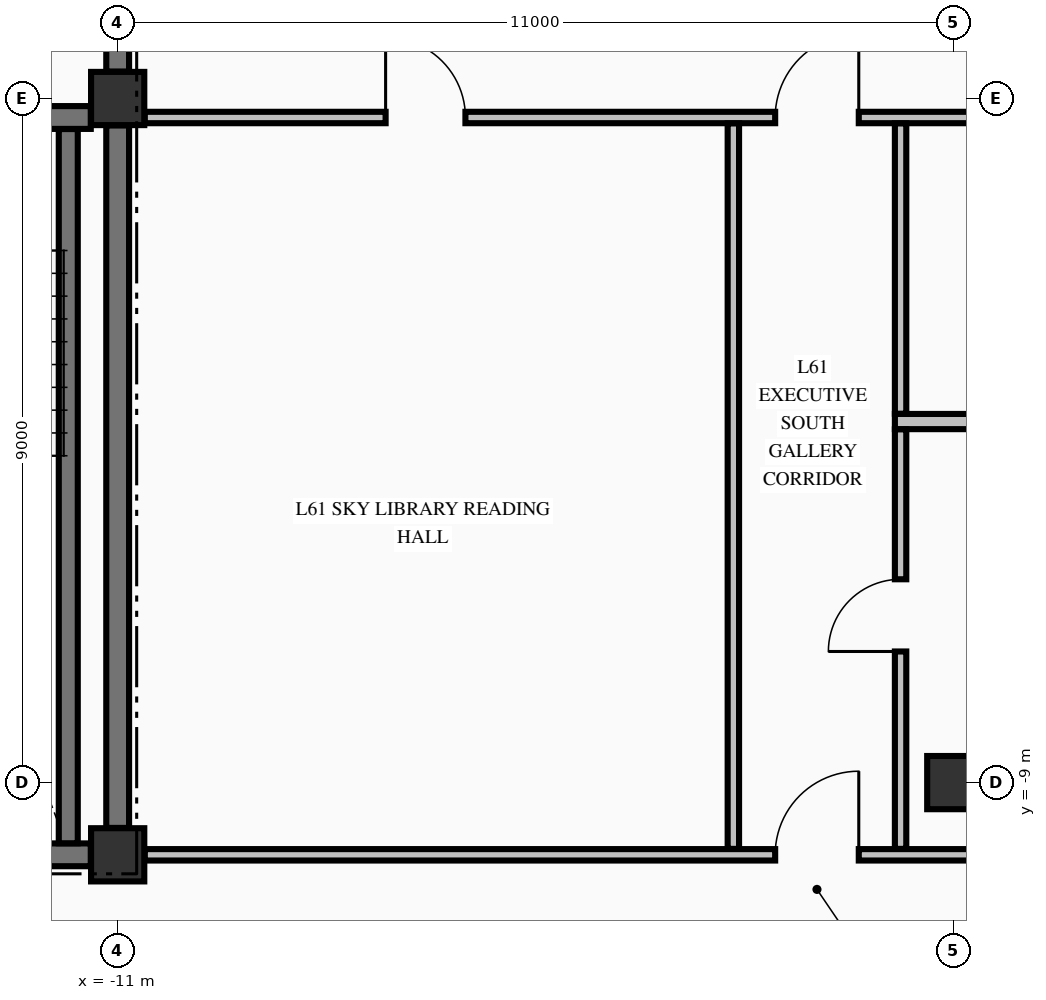
"""IFC4 building model, lengths in metres.
Left out: names, types, materials, properties, quantities, classifications, styles, units other than length and angle.
Written with IfcOpenShell. Run it as: python <this file> out.ifc"""

import sys

from ifc_helpers import new_model, si_unit, direction, frame, frame_2d, origin, origin_2d, place, context, subcontext, project, spatial, rectangle, extrude, element, fill, save


model = new_model("IFC4")
c1 = context("Model", 3, precision=1e-05, world=origin(), true_north=direction((0.0, 1.0)))
c2 = subcontext(c1, "Body", "Model", "MODEL_VIEW")
j1 = project(units=[si_unit("LENGTHUNIT", "METRE"), si_unit("PLANEANGLEUNIT", "RADIAN")], contexts=[c1])
p1 = place(None, origin())
s1 = spatial("IfcSite", under=j1, at=p1, CompositionType="ELEMENT")
p2 = place(p1, origin())
s2 = spatial("IfcBuilding", under=s1, at=p2, CompositionType="ELEMENT")
p3 = place(p2, frame((0.0, 0.0, 233.28)))
s3 = spatial("IfcBuildingStorey", under=s2, at=p3, CompositionType="ELEMENT", Elevation=233.28)
for number, where, z_axis, x_axis in (
    (1, (-11.0, -9.95, -0.25), (0.0, 0.0, 1.0), (1.0, 0.0, 0.0)),
    (2, (-11.0, 0.0, -0.25), (0.0, 0.0, 1.0), (1.0, 0.0, 0.0)),
    (3, (0.0, -9.0, -0.25), (0.0, 0.0, 1.0), (1.0, 0.0, 0.0)),
):
    element("IfcColumn", number, at=place(p3, frame(where, z_axis=z_axis, x_axis=x_axis)), inside=s3, PredefinedType="COLUMN", context=c2, shape_type="SweptSolid", body=[
        extrude(rectangle(XDim=0.7, YDim=0.7, at=origin_2d()), origin(), (0.0, 0.0, 1.0), 3.23),
    ])
p4 = place(p3, frame((-14.7, -9.95, 0.0), z_axis=(0.0, 0.0, 1.0), x_axis=(1.0, 0.0, 0.0)))
e4 = element("IfcWall", 4, at=p4, inside=s3, PredefinedType="SHEAR", context=c2, shape_type="SweptSolid", body=[
    extrude(rectangle(XDim=3.346, YDim=0.3, at=frame_2d((1.673, 0.0))), origin(), (0.0, 0.0, 1.0), 2.98),
])
p5 = place(p3, frame((-20.571, -0.25, 0.0), z_axis=(0.0, 0.0, 1.0), x_axis=(1.0, 0.0, 0.0)))
e5 = element("IfcWall", 5, at=p5, inside=s3, PredefinedType="SHEAR", context=c2, shape_type="SweptSolid", body=[
    extrude(rectangle(XDim=9.217, YDim=0.3, at=frame_2d((4.608, 0.0))), origin(), (0.0, 0.0, 1.0), 2.98),
])
p6 = place(p5, frame((6.871, 0.0, 0.0)))
e6 = element("IfcOpeningElement", 6, at=p6, cuts=e5, PredefinedType="OPENING", context=c2, shape_type="SweptSolid", body=[
    extrude(rectangle(XDim=1.1, YDim=2.15, at=frame_2d((0.55, 1.075))), frame((0.0, 0.16, 0.0), z_axis=(0.0, -1.0, 0.0), x_axis=(1.0, 0.0, 0.0)), (0.0, 0.0, 1.0), 0.32),
])
p7 = place(p3, frame((-10.644, -9.95, 0.0), z_axis=(0.0, 0.0, 1.0), x_axis=(1.0, 0.0, 0.0)))
e7 = element("IfcWall", 7, at=p7, inside=s3, PredefinedType="PARTITIONING", context=c2, shape_type="SweptSolid", body=[
    extrude(rectangle(XDim=21.288, YDim=0.15, at=frame_2d((10.644, 0.0))), origin(), (0.0, 0.0, 1.0), 2.98),
])
p8 = place(p7, frame((8.294, 0.0, 0.0)))
e8 = element("IfcOpeningElement", 8, at=p8, cuts=e7, PredefinedType="OPENING", context=c2, shape_type="SweptSolid", body=[
    extrude(rectangle(XDim=1.1, YDim=2.15, at=frame_2d((0.55, 1.075))), frame((0.0, 0.085, 0.0), z_axis=(0.0, -1.0, 0.0), x_axis=(1.0, 0.0, 0.0)), (0.0, 0.0, 1.0), 0.17),
])
p9 = place(p7, frame((13.769, 0.0, 0.0)))
e9 = element("IfcOpeningElement", 9, at=p9, cuts=e7, PredefinedType="OPENING", context=c2, shape_type="SweptSolid", body=[
    extrude(rectangle(XDim=0.95, YDim=2.15, at=frame_2d((0.475, 1.075))), frame((0.0, 0.085, 0.0), z_axis=(0.0, -1.0, 0.0), x_axis=(1.0, 0.0, 0.0)), (0.0, 0.0, 1.0), 0.17),
])
p10 = place(p7, frame((17.994, 0.0, 0.0)))
e10 = element("IfcOpeningElement", 10, at=p10, cuts=e7, PredefinedType="OPENING", context=c2, shape_type="SweptSolid", body=[
    extrude(rectangle(XDim=0.9, YDim=2.15, at=frame_2d((0.45, 1.075))), frame((0.0, 0.085, 0.0), z_axis=(0.0, -1.0, 0.0), x_axis=(1.0, 0.0, 0.0)), (0.0, 0.0, 1.0), 0.17),
])
p11 = place(p3, frame((-0.775, -4.25, 0.0), z_axis=(0.0, 0.0, 1.0), x_axis=(1.0, 0.0, 0.0)))
e11 = element("IfcWall", 11, at=p11, inside=s3, PredefinedType="PARTITIONING", context=c2, shape_type="SweptSolid", body=[
    extrude(rectangle(XDim=11.622, YDim=0.2, at=frame_2d((5.811, 0.0))), origin(), (0.0, 0.0, 1.0), 2.98),
])
p12 = place(p3, frame((-10.644, -0.25, 0.0), z_axis=(0.0, 0.0, 1.0), x_axis=(1.0, 0.0, 0.0)))
e12 = element("IfcWall", 12, at=p12, inside=s3, PredefinedType="PARTITIONING", context=c2, shape_type="SweptSolid", body=[
    extrude(rectangle(XDim=21.288, YDim=0.15, at=frame_2d((10.644, 0.0))), origin(), (0.0, 0.0, 1.0), 2.98),
])
p13 = place(p12, frame((8.294, 0.0, 0.0)))
e13 = element("IfcOpeningElement", 13, at=p13, cuts=e12, PredefinedType="OPENING", context=c2, shape_type="SweptSolid", body=[
    extrude(rectangle(XDim=1.1, YDim=2.15, at=frame_2d((0.55, 1.075))), frame((0.0, 0.085, 0.0), z_axis=(0.0, -1.0, 0.0), x_axis=(1.0, 0.0, 0.0)), (0.0, 0.0, 1.0), 0.17),
])
p14 = place(p12, frame((3.169, 0.0, 0.0)))
e14 = element("IfcOpeningElement", 14, at=p14, cuts=e12, PredefinedType="OPENING", context=c2, shape_type="SweptSolid", body=[
    extrude(rectangle(XDim=1.05, YDim=2.15, at=frame_2d((0.525, 1.075))), frame((0.0, 0.085, 0.0), z_axis=(0.0, -1.0, 0.0), x_axis=(1.0, 0.0, 0.0)), (0.0, 0.0, 1.0), 0.17),
])
p15 = place(p12, frame((15.319, 0.0, 0.0)))
e15 = element("IfcOpeningElement", 15, at=p15, cuts=e12, PredefinedType="OPENING", context=c2, shape_type="SweptSolid", body=[
    extrude(rectangle(XDim=0.95, YDim=2.15, at=frame_2d((0.475, 1.075))), frame((0.0, 0.085, 0.0), z_axis=(0.0, -1.0, 0.0), x_axis=(1.0, 0.0, 0.0)), (0.0, 0.0, 1.0), 0.17),
])
p16 = place(p3, frame((-11.65, -9.798, 0.0), z_axis=(0.0, 0.0, 1.0), x_axis=(0.0, 1.0, 0.0)))
e16 = element("IfcWall", 16, at=p16, inside=s3, PredefinedType="SOLIDWALL", context=c2, shape_type="SweptSolid", body=[
    extrude(rectangle(XDim=9.396, YDim=0.25, at=frame_2d((4.698, 0.0))), origin(), (0.0, 0.0, 1.0), 2.98),
])
p17 = place(p3, frame((-11.0, -9.596, 0.0), z_axis=(0.0, 0.0, 1.0), x_axis=(0.0, 1.0, 0.0)))
e17 = element("IfcWall", 17, at=p17, inside=s3, PredefinedType="SHEAR", context=c2, shape_type="SweptSolid", body=[
    extrude(rectangle(XDim=9.242, YDim=0.3, at=frame_2d((4.621, 0.0))), origin(), (0.0, 0.0, 1.0), 2.98),
])
p18 = place(p3, frame((-11.0, 0.354, 0.0), z_axis=(0.0, 0.0, 1.0), x_axis=(0.0, 1.0, 0.0)))
e18 = element("IfcWall", 18, at=p18, inside=s3, PredefinedType="SHEAR", context=c2, shape_type="SweptSolid", body=[
    extrude(rectangle(XDim=2.394, YDim=0.3, at=frame_2d((1.197, 0.0))), origin(), (0.0, 0.0, 1.0), 2.98),
])
p19 = place(p18, frame((0.746, 0.0, 0.0)))
e19 = element("IfcOpeningElement", 19, at=p19, cuts=e18, PredefinedType="OPENING", context=c2, shape_type="SweptSolid", body=[
    extrude(rectangle(XDim=1.1, YDim=2.15, at=frame_2d((0.55, 1.075))), frame((0.0, 0.16, 0.0), z_axis=(0.0, -1.0, 0.0), x_axis=(1.0, 0.0, 0.0)), (0.0, 0.0, 1.0), 0.32),
])
p20 = place(p3, frame((-2.9, -9.872, 0.0), z_axis=(0.0, 0.0, 1.0), x_axis=(0.0, 1.0, 0.0)))
e20 = element("IfcWall", 20, at=p20, inside=s3, PredefinedType="PARTITIONING", context=c2, shape_type="SweptSolid", body=[
    extrude(rectangle(XDim=9.544, YDim=0.15, at=frame_2d((4.772, 0.0))), origin(), (0.0, 0.0, 1.0), 2.98),
])
p21 = place(p3, frame((-0.7, -9.872, 0.0), z_axis=(0.0, 0.0, 1.0), x_axis=(0.0, 1.0, 0.0)))
e21 = element("IfcWall", 21, at=p21, inside=s3, PredefinedType="PARTITIONING", context=c2, shape_type="SweptSolid", body=[
    extrude(rectangle(XDim=5.519, YDim=0.15, at=frame_2d((2.76, 0.0))), origin(), (0.0, 0.0, 1.0), 2.98),
])
p22 = place(p21, frame((2.597, 0.0, 0.0)))
e22 = element("IfcOpeningElement", 22, at=p22, cuts=e21, PredefinedType="OPENING", context=c2, shape_type="SweptSolid", body=[
    extrude(rectangle(XDim=0.95, YDim=2.15, at=frame_2d((0.475, 1.075))), frame((0.0, 0.085, 0.0), z_axis=(0.0, -1.0, 0.0), x_axis=(1.0, 0.0, 0.0)), (0.0, 0.0, 1.0), 0.17),
])
p23 = place(p3, frame((-0.7, -4.147, 0.0), z_axis=(0.0, 0.0, 1.0), x_axis=(0.0, 1.0, 0.0)))
e23 = element("IfcWall", 23, at=p23, inside=s3, PredefinedType="PARTITIONING", context=c2, shape_type="SweptSolid", body=[
    extrude(rectangle(XDim=3.819, YDim=0.15, at=frame_2d((1.91, 0.0))), origin(), (0.0, 0.0, 1.0), 2.98),
])
p24 = place(p8, origin())
e24 = element("IfcDoor", 24, at=p24, inside=s3, OperationType="SINGLE_SWING_RIGHT", PredefinedType="DOOR", context=c2, shape_type="SweptSolid", body=[
    extrude(rectangle(XDim=1.1, YDim=2.15, at=frame_2d((0.55, 1.075))), frame((0.0, 0.025, 0.0), z_axis=(0.0, -1.0, 0.0), x_axis=(1.0, 0.0, 0.0)), (0.0, 0.0, 1.0), 0.05),
])
fill(e8, e24)
p25 = place(p13, origin())
e25 = element("IfcDoor", 25, at=p25, inside=s3, OperationType="SINGLE_SWING_RIGHT", PredefinedType="DOOR", context=c2, shape_type="SweptSolid", body=[
    extrude(rectangle(XDim=1.1, YDim=2.15, at=frame_2d((0.55, 1.075))), frame((0.0, 0.025, 0.0), z_axis=(0.0, -1.0, 0.0), x_axis=(1.0, 0.0, 0.0)), (0.0, 0.0, 1.0), 0.05),
])
fill(e13, e25)
p26 = place(p14, origin())
e26 = element("IfcDoor", 26, at=p26, inside=s3, OperationType="SINGLE_SWING_LEFT", PredefinedType="DOOR", context=c2, shape_type="SweptSolid", body=[
    extrude(rectangle(XDim=1.05, YDim=2.15, at=frame_2d((0.525, 1.075))), frame((0.0, 0.025, 0.0), z_axis=(0.0, -1.0, 0.0), x_axis=(1.0, 0.0, 0.0)), (0.0, 0.0, 1.0), 0.05),
])
fill(e14, e26)
p27 = place(p22, origin())
e27 = element("IfcDoor", 27, at=p27, inside=s3, OperationType="SINGLE_SWING_LEFT", PredefinedType="DOOR", context=c2, shape_type="SweptSolid", body=[
    extrude(rectangle(XDim=0.95, YDim=2.15, at=frame_2d((0.475, 1.075))), frame((0.0, 0.025, 0.0), z_axis=(0.0, -1.0, 0.0), x_axis=(1.0, 0.0, 0.0)), (0.0, 0.0, 1.0), 0.05),
])
fill(e22, e27)
save(model, sys.argv[1])
